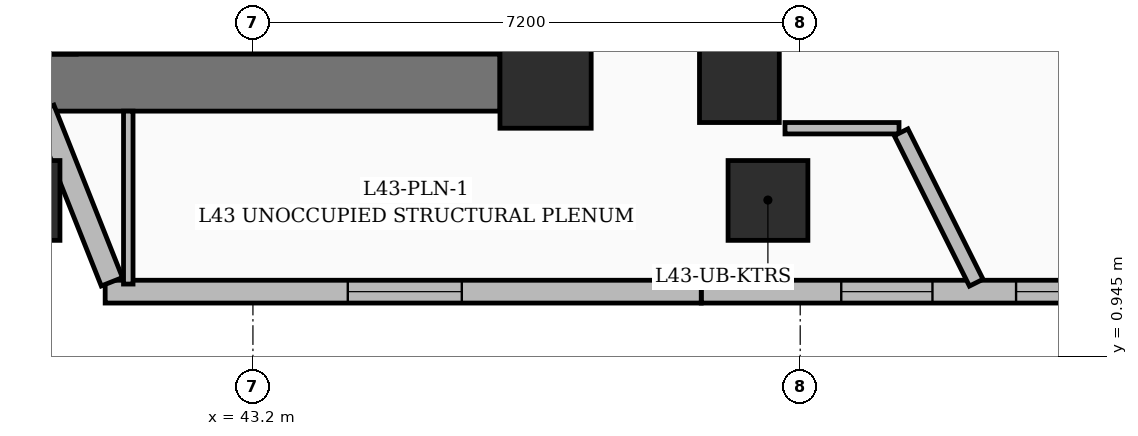
"""IFC4 building model, lengths in metres.
Left out: names, types, materials, properties, quantities, classifications, styles, units other than length and angle.
Written with IfcOpenShell. Run it as: python <this file> out.ifc"""

import sys

from ifc_helpers import new_model, si_unit, direction, frame, frame_2d, origin, origin_2d, place, context, subcontext, project, spatial, rectangle, extrude, element, fill, save


model = new_model("IFC4")
c1 = context("Model", 3, precision=1e-05, world=origin(), true_north=direction((0.0, 1.0)))
c2 = subcontext(c1, "Body", "Model", "MODEL_VIEW")
j1 = project(units=[si_unit("LENGTHUNIT", "METRE"), si_unit("PLANEANGLEUNIT", "RADIAN")], contexts=[c1])
p1 = place(None, origin())
s1 = spatial("IfcSite", under=j1, at=p1, CompositionType="ELEMENT")
p2 = place(p1, origin())
s2 = spatial("IfcBuilding", under=s1, at=p2, CompositionType="ELEMENT")
p3 = place(p2, frame((0.0, 0.0, 168.0)))
s3 = spatial("IfcBuildingStorey", under=s2, at=p3, CompositionType="ELEMENT", Elevation=168.0)
p4 = place(p3, frame((47.05, 4.55, 0.0), z_axis=(0.0, 0.0, 1.0), x_axis=(1.0, 0.0, 0.0)))
e1 = element("IfcColumn", 1, at=p4, inside=s3, PredefinedType="COLUMN", context=c2, shape_type="SweptSolid", body=[
    extrude(rectangle(XDim=1.2, YDim=1.2, at=origin_2d()), origin(), (0.0, 0.0, 1.0), 3.6),
])
p5 = place(p3, frame((49.6, 4.55, 0.0), z_axis=(0.0, 0.0, 1.0), x_axis=(1.0, 0.0, 0.0)))
e2 = element("IfcColumn", 2, at=p5, inside=s3, PredefinedType="COLUMN", context=c2, shape_type="SweptSolid", body=[
    extrude(rectangle(XDim=1.05, YDim=1.05, at=origin_2d()), origin(), (0.0, 0.0, 1.0), 3.6),
])
p6 = place(p3, frame((35.75, 4.55, 0.0), z_axis=(0.0, 0.0, 1.0), x_axis=(1.0, 0.0, 0.0)))
e3 = element("IfcWall", 3, at=p6, inside=s3, PredefinedType="SHEAR", context=c2, shape_type="SweptSolid", body=[
    extrude(rectangle(XDim=10.7, YDim=0.75, at=frame_2d((5.35, 0.0))), origin(), (0.0, 0.0, 1.0), 3.6),
])
p7 = place(p3, frame((40.7, 4.925, 0.0), z_axis=(0.0, 0.0, 1.0), x_axis=(0.0, 1.0, 0.0)))
e4 = element("IfcWall", 4, at=p7, inside=s3, PredefinedType="SOLIDWALL", context=c2, shape_type="SweptSolid", body=[
    extrude(rectangle(XDim=3.0, YDim=0.35, at=frame_2d((1.5, 0.0))), origin(), (0.0, 0.0, 1.0), 3.6),
])
for number, where, z_axis, x_axis in (
    (5, (40.136, 3.0, 0.0), (0.0, 0.0, 1.0), (1.0, 0.0, 0.0)),
    (6, (49.976, 3.0, 0.0), (0.0, 0.0, 1.0), (1.0, 0.0, 0.0)),
):
    element("IfcColumn", number, at=place(p3, frame(where, z_axis=z_axis, x_axis=x_axis)), inside=s3, PredefinedType="COLUMN", context=c2, shape_type="SweptSolid", body=[
        extrude(rectangle(XDim=1.05, YDim=1.05, at=origin_2d()), origin(), (0.0, 0.0, 1.0), 3.6),
    ])
p8 = place(p3, frame((56.36, 1.8, 0.0), z_axis=(0.0, 0.0, 1.0), x_axis=(-1.0, 0.0, 0.0)))
e7 = element("IfcWall", 7, at=p8, inside=s3, PredefinedType="SOLIDWALL", context=c2, shape_type="SweptSolid", body=[
    extrude(rectangle(XDim=7.262, YDim=0.3, at=frame_2d((3.631, 0.0))), origin(), (0.0, 0.0, 1.0), 3.35),
])
p9 = place(p8, frame((4.22, 0.0, 0.8)))
e8 = element("IfcOpeningElement", 8, at=p9, cuts=e7, PredefinedType="OPENING", context=c2, shape_type="SweptSolid", body=[
    extrude(rectangle(XDim=1.2, YDim=1.8, at=frame_2d((0.6, 0.9))), frame((0.0, 0.16, 0.0), z_axis=(0.0, -1.0, 0.0), x_axis=(1.0, 0.0, 0.0)), (0.0, 0.0, 1.0), 0.32),
])
p10 = place(p8, frame((1.52, 0.0, 0.55)))
e9 = element("IfcOpeningElement", 9, at=p10, cuts=e7, PredefinedType="OPENING", context=c2, shape_type="SweptSolid", body=[
    extrude(rectangle(XDim=1.6, YDim=2.2, at=frame_2d((0.8, 1.1))), frame((0.0, 0.16, 0.0), z_axis=(0.0, -1.0, 0.0), x_axis=(1.0, 0.0, 0.0)), (0.0, 0.0, 1.0), 0.32),
])
p11 = place(p3, frame((49.098, 1.8, 0.0), z_axis=(0.0, 0.0, 1.0), x_axis=(-1.0, 0.0, 0.0)))
e10 = element("IfcWall", 10, at=p11, inside=s3, PredefinedType="SOLIDWALL", context=c2, shape_type="SweptSolid", body=[
    extrude(rectangle(XDim=7.842, YDim=0.3, at=frame_2d((3.921, 0.0))), origin(), (0.0, 0.0, 1.0), 3.35),
])
p12 = place(p11, frame((3.15, 0.0, 0.6)))
e11 = element("IfcOpeningElement", 11, at=p12, cuts=e10, PredefinedType="OPENING", context=c2, shape_type="SweptSolid", body=[
    extrude(rectangle(XDim=1.5, YDim=2.1, at=frame_2d((0.75, 1.05))), frame((0.0, 0.16, 0.0), z_axis=(0.0, -1.0, 0.0), x_axis=(1.0, 0.0, 0.0)), (0.0, 0.0, 1.0), 0.32),
])
p13 = place(p3, frame((41.344, 1.93, 0.0), z_axis=(0.0, 0.0, 1.0), x_axis=(-0.369562555971, 0.929205852986, 0.0)))
e12 = element("IfcWall", 12, at=p13, inside=s3, PredefinedType="SOLIDWALL", context=c2, shape_type="SweptSolid", body=[
    extrude(rectangle(XDim=2.442, YDim=0.3, at=frame_2d((1.221, 0.0))), origin(), (0.0, 0.0, 1.0), 2.575),
])
p14 = place(p3, frame((41.56, 1.9, 0.0), z_axis=(0.0, 0.0, 1.0), x_axis=(0.0, 1.0, 0.0)))
e13 = element("IfcWall", 13, at=p14, inside=s3, PredefinedType="PARTITIONING", context=c2, shape_type="SweptSolid", body=[
    extrude(rectangle(XDim=2.275, YDim=0.125, at=frame_2d((1.138, 0.0))), origin(), (0.0, 0.0, 1.0), 2.57),
])
p15 = place(p3, frame((50.2, 3.95, 0.0), z_axis=(0.0, 0.0, 1.0), x_axis=(1.0, 0.0, 0.0)))
e14 = element("IfcWall", 14, at=p15, inside=s3, PredefinedType="PARTITIONING", context=c2, shape_type="SweptSolid", body=[
    extrude(rectangle(XDim=1.5, YDim=0.15, at=frame_2d((0.75, 0.0))), origin(), (0.0, 0.0, 1.0), 2.57),
])
p16 = place(p3, frame((52.716, 1.918, 0.0), z_axis=(0.0, 0.0, 1.0), x_axis=(-0.44703697958, 0.894515477165, 0.0)))
e15 = element("IfcWall", 15, at=p16, inside=s3, PredefinedType="PARTITIONING", context=c2, shape_type="SweptSolid", body=[
    extrude(rectangle(XDim=2.212, YDim=0.2, at=frame_2d((1.106, 0.0))), origin(), (0.0, 0.0, 1.0), 3.35),
])
p17 = place(p9, origin())
e16 = element("IfcWindow", 16, at=p17, inside=s3, PartitioningType="SINGLE_PANEL", PredefinedType="WINDOW", context=c2, shape_type="SweptSolid", body=[
    extrude(rectangle(XDim=1.2, YDim=1.8, at=frame_2d((0.6, 0.9))), frame((0.0, 0.03, 0.0), z_axis=(0.0, -1.0, 0.0), x_axis=(1.0, 0.0, 0.0)), (0.0, 0.0, 1.0), 0.06),
])
fill(e8, e16)
p18 = place(p10, origin())
e17 = element("IfcWindow", 17, at=p18, inside=s3, PartitioningType="SINGLE_PANEL", PredefinedType="WINDOW", context=c2, shape_type="SweptSolid", body=[
    extrude(rectangle(XDim=1.6, YDim=2.2, at=frame_2d((0.8, 1.1))), frame((0.0, 0.03, 0.0), z_axis=(0.0, -1.0, 0.0), x_axis=(1.0, 0.0, 0.0)), (0.0, 0.0, 1.0), 0.06),
])
fill(e9, e17)
p19 = place(p12, origin())
e18 = element("IfcWindow", 18, at=p19, inside=s3, PartitioningType="SINGLE_PANEL", PredefinedType="WINDOW", context=c2, shape_type="SweptSolid", body=[
    extrude(rectangle(XDim=1.5, YDim=2.1, at=frame_2d((0.75, 1.05))), frame((0.0, 0.03, 0.0), z_axis=(0.0, -1.0, 0.0), x_axis=(1.0, 0.0, 0.0)), (0.0, 0.0, 1.0), 0.06),
])
fill(e11, e18)
save(model, sys.argv[1])
